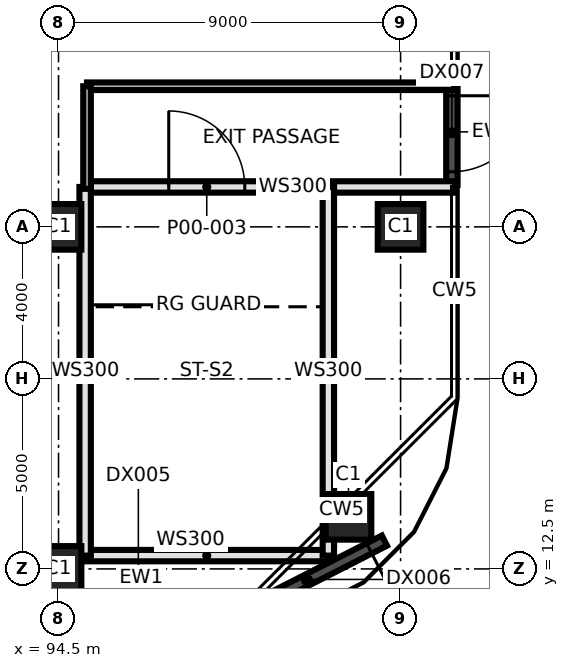
"""IFC4 building model, lengths in metres.
Left out: names, types, materials, properties, quantities, classifications, styles, units other than length and angle.
Written with IfcOpenShell. Run it as: python <this file> out.ifc"""

import sys

from ifc_helpers import new_model, si_unit, direction, frame, frame_2d, origin, origin_2d, place, context, subcontext, project, spatial, rectangle, extrude, element, fill, save


model = new_model("IFC4")
c1 = context("Model", 3, precision=1e-05, world=origin(), true_north=direction((0.0, 1.0)))
c2 = subcontext(c1, "Body", "Model", "MODEL_VIEW")
j1 = project(units=[si_unit("LENGTHUNIT", "METRE"), si_unit("PLANEANGLEUNIT", "RADIAN")], contexts=[c1])
p1 = place(None, origin())
s1 = spatial("IfcSite", under=j1, at=p1, CompositionType="ELEMENT")
p2 = place(p1, origin())
s2 = spatial("IfcBuilding", under=s1, at=p2, CompositionType="ELEMENT")
p3 = place(p2, origin())
s3 = spatial("IfcBuildingStorey", under=s2, at=p3, CompositionType="ELEMENT", Elevation=0.0)
for number, where, z_axis, x_axis in (
    (1, (94.5, 12.5, 0.0), (0.0, 0.0, 1.0), (1.0, 0.0, 0.0)),
    (2, (102.13, 13.87, 0.0), (0.0, 0.0, 1.0), (1.0, 0.0, 0.0)),
    (3, (94.5, 21.5, 0.0), (0.0, 0.0, 1.0), (1.0, 0.0, 0.0)),
    (4, (103.5, 21.5, 0.0), (0.0, 0.0, 1.0), (1.0, 0.0, 0.0)),
):
    element("IfcColumn", number, at=place(p3, frame(where, z_axis=z_axis, x_axis=x_axis)), inside=s3, PredefinedType="COLUMN", context=c2, shape_type="SweptSolid", body=[
        extrude(rectangle(XDim=1.2, YDim=1.2, at=origin_2d()), origin(), (0.0, 0.0, 1.0), 8.0),
    ])
p4 = place(p3, frame((103.075, 13.245, 0.0), z_axis=(0.0, 0.0, 1.0), x_axis=(-0.891009845776, -0.453983980698, 0.0)))
e5 = element("IfcWall", 5, at=p4, inside=s3, PredefinedType="SOLIDWALL", context=c2, shape_type="SweptSolid", body=[
    extrude(rectangle(XDim=4.65, YDim=0.3, at=frame_2d((2.325, 0.0))), origin(), (0.0, 0.0, 1.0), 7.7),
])
p5 = place(p4, frame((0.45, 0.0, 0.0)))
e6 = element("IfcOpeningElement", 6, at=p5, cuts=e5, PredefinedType="OPENING", context=c2, shape_type="SweptSolid", body=[
    extrude(rectangle(XDim=3.6, YDim=3.0, at=frame_2d((1.8, 1.5))), frame((0.0, 0.16, 0.0), z_axis=(0.0, -1.0, 0.0), x_axis=(1.0, 0.0, 0.0)), (0.0, 0.0, 1.0), 0.32),
])
p6 = place(p3, frame((104.85, 25.4, 0.0), z_axis=(0.0, 0.0, 1.0), x_axis=(0.0, -1.0, 0.0)))
e7 = element("IfcWall", 7, at=p6, inside=s3, PredefinedType="SOLIDWALL", context=c2, shape_type="SweptSolid", body=[
    extrude(rectangle(XDim=2.8, YDim=0.3, at=frame_2d((1.4, 0.0))), origin(), (0.0, 0.0, 1.0), 7.7),
])
p7 = place(p6, frame((0.45, 0.0, 0.0)))
e8 = element("IfcOpeningElement", 8, at=p7, cuts=e7, PredefinedType="OPENING", context=c2, shape_type="SweptSolid", body=[
    extrude(rectangle(XDim=2.0, YDim=2.4, at=frame_2d((1.0, 1.2))), frame((0.0, 0.16, 0.0), z_axis=(0.0, -1.0, 0.0), x_axis=(1.0, 0.0, 0.0)), (0.0, 0.0, 1.0), 0.32),
])
p8 = place(p3, frame((95.2, 12.85, 0.0), z_axis=(0.0, 0.0, 1.0), x_axis=(1.0, 0.0, 0.0)))
e9 = element("IfcWall", 9, at=p8, inside=s3, PredefinedType="SOLIDWALL", context=c2, shape_type="SweptSolid", body=[
    extrude(rectangle(XDim=6.4, YDim=0.3, at=frame_2d((3.2, 0.0))), origin(), (0.0, 0.0, 1.0), 6.8),
])
p9 = place(p3, frame((95.2, 22.55, 0.0), z_axis=(0.0, 0.0, 1.0), x_axis=(1.0, 0.0, 0.0)))
e10 = element("IfcWall", 10, at=p9, inside=s3, PredefinedType="SOLIDWALL", context=c2, shape_type="SweptSolid", body=[
    extrude(rectangle(XDim=9.73, YDim=0.3, at=frame_2d((4.865, 0.0))), origin(), (0.0, 0.0, 1.0), 6.8),
])
p10 = place(p9, frame((2.2, 0.0, 0.0)))
e11 = element("IfcOpeningElement", 11, at=p10, cuts=e10, PredefinedType="OPENING", context=c2, shape_type="SweptSolid", body=[
    extrude(rectangle(XDim=2.0, YDim=2.1, at=frame_2d((1.0, 1.05))), frame((0.0, 0.16, 0.0), z_axis=(0.0, -1.0, 0.0), x_axis=(1.0, 0.0, 0.0)), (0.0, 0.0, 1.0), 0.32),
])
p11 = place(p3, frame((95.25, 25.2, 0.0), z_axis=(0.0, 0.0, 1.0), x_axis=(1.0, 0.0, 0.0)))
e12 = element("IfcWall", 12, at=p11, inside=s3, PredefinedType="PARTITIONING", context=c2, shape_type="SweptSolid", body=[
    extrude(rectangle(XDim=9.68, YDim=0.2, at=frame_2d((4.84, 0.0))), origin(), (0.0, 0.0, 1.0), 6.8),
])
for number, where, z_axis, x_axis in (
    (13, (101.6, 12.85, 0.0), (0.0, 0.0, 1.0), (0.0, 1.0, 0.0)),
    (14, (95.2, 12.85, 0.0), (0.0, 0.0, 1.0), (0.0, 1.0, 0.0)),
):
    element("IfcWall", number, at=place(p3, frame(where, z_axis=z_axis, x_axis=x_axis)), inside=s3, PredefinedType="SOLIDWALL", context=c2, shape_type="SweptSolid", body=[
        extrude(rectangle(XDim=9.7, YDim=0.3, at=frame_2d((4.85, 0.0))), origin(), (0.0, 0.0, 1.0), 6.8),
    ])
p12 = place(p3, frame((95.25, 22.5, 0.0), z_axis=(0.0, 0.0, 1.0), x_axis=(0.0, 1.0, 0.0)))
e15 = element("IfcWall", 15, at=p12, inside=s3, PredefinedType="PARTITIONING", context=c2, shape_type="SweptSolid", body=[
    extrude(rectangle(XDim=2.7, YDim=0.2, at=frame_2d((1.35, 0.0))), origin(), (0.0, 0.0, 1.0), 7.7),
])
p13 = place(p5, origin())
e16 = element("IfcDoor", 16, at=p13, inside=s3, OperationType="SINGLE_SWING_LEFT", PredefinedType="DOOR", context=c2, shape_type="SweptSolid", body=[
    extrude(rectangle(XDim=3.6, YDim=3.0, at=frame_2d((1.8, 1.5))), frame((0.0, 0.025, 0.0), z_axis=(0.0, -1.0, 0.0), x_axis=(1.0, 0.0, 0.0)), (0.0, 0.0, 1.0), 0.05),
])
fill(e6, e16)
p14 = place(p7, origin())
e17 = element("IfcDoor", 17, at=p14, inside=s3, OperationType="SINGLE_SWING_LEFT", PredefinedType="DOOR", context=c2, shape_type="SweptSolid", body=[
    extrude(rectangle(XDim=2.0, YDim=2.4, at=frame_2d((1.0, 1.2))), frame((0.0, 0.025, 0.0), z_axis=(0.0, -1.0, 0.0), x_axis=(1.0, 0.0, 0.0)), (0.0, 0.0, 1.0), 0.05),
])
fill(e8, e17)
p15 = place(p10, origin())
e18 = element("IfcDoor", 18, at=p15, inside=s3, OperationType="SINGLE_SWING_LEFT", PredefinedType="DOOR", context=c2, shape_type="SweptSolid", body=[
    extrude(rectangle(XDim=2.0, YDim=2.1, at=frame_2d((1.0, 1.05))), frame((0.0, 0.025, 0.0), z_axis=(0.0, -1.0, 0.0), x_axis=(1.0, 0.0, 0.0)), (0.0, 0.0, 1.0), 0.05),
])
fill(e11, e18)
save(model, sys.argv[1])
